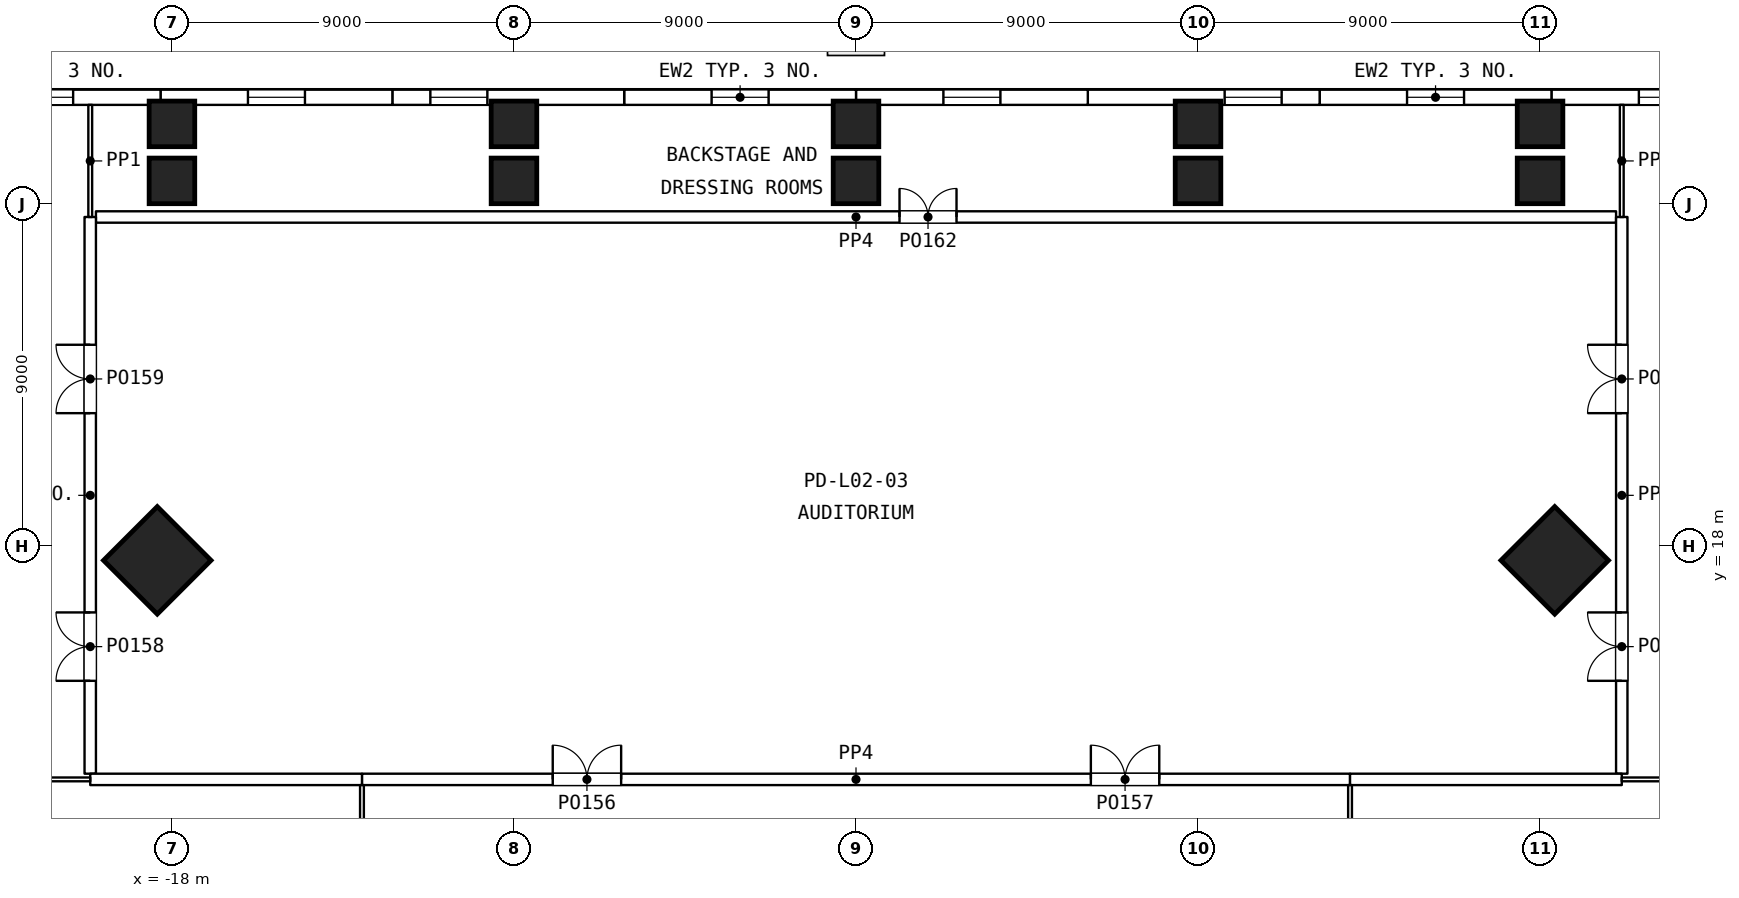
"""IFC4 building model, lengths in metres.
Left out: names, types, materials, properties, quantities, classifications, styles, units other than length and angle.
Written with IfcOpenShell. Run it as: python <this file> out.ifc"""

import sys

from ifc_helpers import new_model, si_unit, direction, frame, frame_2d, origin, origin_2d, place, context, subcontext, project, spatial, rectangle, extrude, element, fill, save


model = new_model("IFC4")
c1 = context("Model", 3, precision=1e-05, world=origin(), true_north=direction((0.0, 1.0)))
c2 = subcontext(c1, "Body", "Model", "MODEL_VIEW")
j1 = project(units=[si_unit("LENGTHUNIT", "METRE"), si_unit("PLANEANGLEUNIT", "RADIAN")], contexts=[c1])
p1 = place(None, origin())
s1 = spatial("IfcSite", under=j1, at=p1, CompositionType="ELEMENT")
p2 = place(p1, origin())
s2 = spatial("IfcBuilding", under=s1, at=p2, CompositionType="ELEMENT")
p3 = place(p2, frame((0.0, 0.0, 12.6)))
s3 = spatial("IfcBuildingStorey", under=s2, at=p3, CompositionType="ELEMENT", Elevation=12.6)
for number, where, z_axis, x_axis in (
    (1, (-18.0, 27.6, 0.0), (0.0, 0.0, 1.0), (1.0, 0.0, 0.0)),
    (2, (-18.0, 29.1, 0.0), (0.0, 0.0, 1.0), (1.0, 0.0, 0.0)),
    (3, (-9.0, 27.6, 0.0), (0.0, 0.0, 1.0), (1.0, 0.0, 0.0)),
    (4, (-9.0, 29.1, 0.0), (0.0, 0.0, 1.0), (1.0, 0.0, 0.0)),
    (5, (0.0, 27.6, 0.0), (0.0, 0.0, 1.0), (1.0, 0.0, 0.0)),
    (6, (0.0, 29.1, 0.0), (0.0, 0.0, 1.0), (1.0, 0.0, 0.0)),
    (7, (9.0, 27.6, 0.0), (0.0, 0.0, 1.0), (1.0, 0.0, 0.0)),
    (8, (9.0, 29.1, 0.0), (0.0, 0.0, 1.0), (1.0, 0.0, 0.0)),
    (9, (18.0, 27.6, 0.0), (0.0, 0.0, 1.0), (1.0, 0.0, 0.0)),
    (10, (18.0, 29.1, 0.0), (0.0, 0.0, 1.0), (1.0, 0.0, 0.0)),
):
    element("IfcColumn", number, at=place(p3, frame(where, z_axis=z_axis, x_axis=x_axis)), inside=s3, PredefinedType="COLUMN", context=c2, shape_type="SweptSolid", body=[
        extrude(rectangle(XDim=1.2, YDim=1.2, at=origin_2d()), origin(), (0.0, 0.0, 1.0), 5.4),
    ])
for number, where, z_axis, x_axis in (
    (11, (-18.386, 17.614, 0.0), (0.0, 0.0, 1.0), (0.707, 0.707, 0.0)),
    (12, (18.386, 17.614, 0.0), (0.0, 0.0, 1.0), (-0.707, 0.707, 0.0)),
):
    element("IfcColumn", number, at=place(p3, frame(where, z_axis=z_axis, x_axis=x_axis)), inside=s3, PredefinedType="COLUMN", context=c2, shape_type="SweptSolid", body=[
        extrude(rectangle(XDim=2.0, YDim=2.0, at=origin_2d()), origin(), (0.0, 0.0, 1.0), 5.4),
    ])
p4 = place(p3, frame((24.4, 29.8, 0.0), z_axis=(0.0, 0.0, 1.0), x_axis=(-1.0, 0.0, 0.0)))
e13 = element("IfcWall", 13, at=p4, inside=s3, PredefinedType="SOLIDWALL", context=c2, shape_type="SweptSolid", body=[
    extrude(rectangle(XDim=6.1, YDim=0.4, at=frame_2d((3.05, 0.0))), origin(), (0.0, 0.0, 1.0), 5.1),
])
p5 = place(p4, frame((2.3, 0.0, 1.0)))
e14 = element("IfcOpeningElement", 14, at=p5, cuts=e13, PredefinedType="OPENING", context=c2, shape_type="SweptSolid", body=[
    extrude(rectangle(XDim=1.5, YDim=2.4, at=frame_2d((0.75, 1.2))), frame((0.0, 0.21, 0.0), z_axis=(0.0, -1.0, 0.0), x_axis=(1.0, 0.0, 0.0)), (0.0, 0.0, 1.0), 0.42),
])
p6 = place(p3, frame((18.3, 29.8, 0.0), z_axis=(0.0, 0.0, 1.0), x_axis=(-1.0, 0.0, 0.0)))
e15 = element("IfcWall", 15, at=p6, inside=s3, PredefinedType="SOLIDWALL", context=c2, shape_type="SweptSolid", body=[
    extrude(rectangle(XDim=6.1, YDim=0.4, at=frame_2d((3.05, 0.0))), origin(), (0.0, 0.0, 1.0), 5.1),
])
p7 = place(p6, frame((2.3, 0.0, 1.0)))
e16 = element("IfcOpeningElement", 16, at=p7, cuts=e15, PredefinedType="OPENING", context=c2, shape_type="SweptSolid", body=[
    extrude(rectangle(XDim=1.5, YDim=2.4, at=frame_2d((0.75, 1.2))), frame((0.0, 0.21, 0.0), z_axis=(0.0, -1.0, 0.0), x_axis=(1.0, 0.0, 0.0)), (0.0, 0.0, 1.0), 0.42),
])
p8 = place(p3, frame((12.2, 29.8, 0.0), z_axis=(0.0, 0.0, 1.0), x_axis=(-1.0, 0.0, 0.0)))
e17 = element("IfcWall", 17, at=p8, inside=s3, PredefinedType="SOLIDWALL", context=c2, shape_type="SweptSolid", body=[
    extrude(rectangle(XDim=6.1, YDim=0.4, at=frame_2d((3.05, 0.0))), origin(), (0.0, 0.0, 1.0), 5.1),
])
p9 = place(p8, frame((1.0, 0.0, 1.0)))
e18 = element("IfcOpeningElement", 18, at=p9, cuts=e17, PredefinedType="OPENING", context=c2, shape_type="SweptSolid", body=[
    extrude(rectangle(XDim=1.5, YDim=2.4, at=frame_2d((0.75, 1.2))), frame((0.0, 0.21, 0.0), z_axis=(0.0, -1.0, 0.0), x_axis=(1.0, 0.0, 0.0)), (0.0, 0.0, 1.0), 0.42),
])
p10 = place(p3, frame((6.1, 29.8, 0.0), z_axis=(0.0, 0.0, 1.0), x_axis=(-1.0, 0.0, 0.0)))
e19 = element("IfcWall", 19, at=p10, inside=s3, PredefinedType="SOLIDWALL", context=c2, shape_type="SweptSolid", body=[
    extrude(rectangle(XDim=6.1, YDim=0.4, at=frame_2d((3.05, 0.0))), origin(), (0.0, 0.0, 1.0), 5.1),
])
p11 = place(p10, frame((2.3, 0.0, 1.0)))
e20 = element("IfcOpeningElement", 20, at=p11, cuts=e19, PredefinedType="OPENING", context=c2, shape_type="SweptSolid", body=[
    extrude(rectangle(XDim=1.5, YDim=2.4, at=frame_2d((0.75, 1.2))), frame((0.0, 0.21, 0.0), z_axis=(0.0, -1.0, 0.0), x_axis=(1.0, 0.0, 0.0)), (0.0, 0.0, 1.0), 0.42),
])
p12 = place(p3, frame((0.0, 29.8, 0.0), z_axis=(0.0, 0.0, 1.0), x_axis=(-1.0, 0.0, 0.0)))
e21 = element("IfcWall", 21, at=p12, inside=s3, PredefinedType="SOLIDWALL", context=c2, shape_type="SweptSolid", body=[
    extrude(rectangle(XDim=6.1, YDim=0.4, at=frame_2d((3.05, 0.0))), origin(), (0.0, 0.0, 1.0), 5.1),
])
p13 = place(p12, frame((2.3, 0.0, 1.0)))
e22 = element("IfcOpeningElement", 22, at=p13, cuts=e21, PredefinedType="OPENING", context=c2, shape_type="SweptSolid", body=[
    extrude(rectangle(XDim=1.5, YDim=2.4, at=frame_2d((0.75, 1.2))), frame((0.0, 0.21, 0.0), z_axis=(0.0, -1.0, 0.0), x_axis=(1.0, 0.0, 0.0)), (0.0, 0.0, 1.0), 0.42),
])
p14 = place(p3, frame((-6.1, 29.8, 0.0), z_axis=(0.0, 0.0, 1.0), x_axis=(-1.0, 0.0, 0.0)))
e23 = element("IfcWall", 23, at=p14, inside=s3, PredefinedType="SOLIDWALL", context=c2, shape_type="SweptSolid", body=[
    extrude(rectangle(XDim=6.1, YDim=0.4, at=frame_2d((3.05, 0.0))), origin(), (0.0, 0.0, 1.0), 5.1),
])
p15 = place(p14, frame((3.6, 0.0, 1.0)))
e24 = element("IfcOpeningElement", 24, at=p15, cuts=e23, PredefinedType="OPENING", context=c2, shape_type="SweptSolid", body=[
    extrude(rectangle(XDim=1.5, YDim=2.4, at=frame_2d((0.75, 1.2))), frame((0.0, 0.21, 0.0), z_axis=(0.0, -1.0, 0.0), x_axis=(1.0, 0.0, 0.0)), (0.0, 0.0, 1.0), 0.42),
])
p16 = place(p3, frame((-12.2, 29.8, 0.0), z_axis=(0.0, 0.0, 1.0), x_axis=(-1.0, 0.0, 0.0)))
e25 = element("IfcWall", 25, at=p16, inside=s3, PredefinedType="SOLIDWALL", context=c2, shape_type="SweptSolid", body=[
    extrude(rectangle(XDim=6.1, YDim=0.4, at=frame_2d((3.05, 0.0))), origin(), (0.0, 0.0, 1.0), 5.1),
])
p17 = place(p16, frame((2.3, 0.0, 1.0)))
e26 = element("IfcOpeningElement", 26, at=p17, cuts=e25, PredefinedType="OPENING", context=c2, shape_type="SweptSolid", body=[
    extrude(rectangle(XDim=1.5, YDim=2.4, at=frame_2d((0.75, 1.2))), frame((0.0, 0.21, 0.0), z_axis=(0.0, -1.0, 0.0), x_axis=(1.0, 0.0, 0.0)), (0.0, 0.0, 1.0), 0.42),
])
p18 = place(p3, frame((-18.3, 29.8, 0.0), z_axis=(0.0, 0.0, 1.0), x_axis=(-1.0, 0.0, 0.0)))
e27 = element("IfcWall", 27, at=p18, inside=s3, PredefinedType="SOLIDWALL", context=c2, shape_type="SweptSolid", body=[
    extrude(rectangle(XDim=6.1, YDim=0.4, at=frame_2d((3.05, 0.0))), origin(), (0.0, 0.0, 1.0), 5.1),
])
p19 = place(p18, frame((2.3, 0.0, 1.0)))
e28 = element("IfcOpeningElement", 28, at=p19, cuts=e27, PredefinedType="OPENING", context=c2, shape_type="SweptSolid", body=[
    extrude(rectangle(XDim=1.5, YDim=2.4, at=frame_2d((0.75, 1.2))), frame((0.0, 0.21, 0.0), z_axis=(0.0, -1.0, 0.0), x_axis=(1.0, 0.0, 0.0)), (0.0, 0.0, 1.0), 0.42),
])
p20 = place(p3, frame((-20.0, 26.65, 0.0), z_axis=(0.0, 0.0, 1.0), x_axis=(1.0, 0.0, 0.0)))
e29 = element("IfcWall", 29, at=p20, inside=s3, PredefinedType="PARTITIONING", context=c2, shape_type="SweptSolid", body=[
    extrude(rectangle(XDim=40.0, YDim=0.3, at=frame_2d((20.0, 0.0))), origin(), (0.0, 0.0, 1.0), 4.51),
])
p21 = place(p20, frame((21.145, 0.0, 0.0)))
e30 = element("IfcOpeningElement", 30, at=p21, cuts=e29, PredefinedType="OPENING", context=c2, shape_type="SweptSolid", body=[
    extrude(rectangle(XDim=1.5, YDim=2.1, at=frame_2d((0.75, 1.05))), frame((0.0, 0.16, 0.0), z_axis=(0.0, -1.0, 0.0), x_axis=(1.0, 0.0, 0.0)), (0.0, 0.0, 1.0), 0.32),
])
p22 = place(p3, frame((-20.15, 12.0, 0.0), z_axis=(0.0, 0.0, 1.0), x_axis=(0.0, 1.0, 0.0)))
e31 = element("IfcWall", 31, at=p22, inside=s3, PredefinedType="PARTITIONING", context=c2, shape_type="SweptSolid", body=[
    extrude(rectangle(XDim=14.65, YDim=0.3, at=frame_2d((7.325, 0.0))), origin(), (0.0, 0.0, 1.0), 5.1),
])
p23 = place(p22, frame((2.444, 0.0, 0.0)))
e32 = element("IfcOpeningElement", 32, at=p23, cuts=e31, PredefinedType="OPENING", context=c2, shape_type="SweptSolid", body=[
    extrude(rectangle(XDim=1.8, YDim=2.1, at=frame_2d((0.9, 1.05))), frame((0.0, 0.16, 0.0), z_axis=(0.0, -1.0, 0.0), x_axis=(1.0, 0.0, 0.0)), (0.0, 0.0, 1.0), 0.32),
])
p24 = place(p22, frame((9.488, 0.0, 0.0)))
e33 = element("IfcOpeningElement", 33, at=p24, cuts=e31, PredefinedType="OPENING", context=c2, shape_type="SweptSolid", body=[
    extrude(rectangle(XDim=1.8, YDim=2.1, at=frame_2d((0.9, 1.05))), frame((0.0, 0.16, 0.0), z_axis=(0.0, -1.0, 0.0), x_axis=(1.0, 0.0, 0.0)), (0.0, 0.0, 1.0), 0.32),
])
p25 = place(p3, frame((20.15, 12.0, 0.0), z_axis=(0.0, 0.0, 1.0), x_axis=(0.0, 1.0, 0.0)))
e34 = element("IfcWall", 34, at=p25, inside=s3, PredefinedType="PARTITIONING", context=c2, shape_type="SweptSolid", body=[
    extrude(rectangle(XDim=14.65, YDim=0.3, at=frame_2d((7.325, 0.0))), origin(), (0.0, 0.0, 1.0), 5.1),
])
p26 = place(p25, frame((2.444, 0.0, 0.0)))
e35 = element("IfcOpeningElement", 35, at=p26, cuts=e34, PredefinedType="OPENING", context=c2, shape_type="SweptSolid", body=[
    extrude(rectangle(XDim=1.8, YDim=2.1, at=frame_2d((0.9, 1.05))), frame((0.0, 0.16, 0.0), z_axis=(0.0, -1.0, 0.0), x_axis=(1.0, 0.0, 0.0)), (0.0, 0.0, 1.0), 0.32),
])
p27 = place(p25, frame((9.488, 0.0, 0.0)))
e36 = element("IfcOpeningElement", 36, at=p27, cuts=e34, PredefinedType="OPENING", context=c2, shape_type="SweptSolid", body=[
    extrude(rectangle(XDim=1.8, YDim=2.1, at=frame_2d((0.9, 1.05))), frame((0.0, 0.16, 0.0), z_axis=(0.0, -1.0, 0.0), x_axis=(1.0, 0.0, 0.0)), (0.0, 0.0, 1.0), 0.32),
])
p28 = place(p3, frame((-13.0, 11.85, 0.0), z_axis=(0.0, 0.0, 1.0), x_axis=(1.0, 0.0, 0.0)))
e37 = element("IfcWall", 37, at=p28, inside=s3, PredefinedType="PARTITIONING", context=c2, shape_type="SweptSolid", body=[
    extrude(rectangle(XDim=26.0, YDim=0.3, at=frame_2d((13.0, 0.0))), origin(), (0.0, 0.0, 1.0), 5.1),
])
p29 = place(p28, frame((5.02, 0.0, 0.0)))
e38 = element("IfcOpeningElement", 38, at=p29, cuts=e37, PredefinedType="OPENING", context=c2, shape_type="SweptSolid", body=[
    extrude(rectangle(XDim=1.8, YDim=2.1, at=frame_2d((0.9, 1.05))), frame((0.0, 0.16, 0.0), z_axis=(0.0, -1.0, 0.0), x_axis=(1.0, 0.0, 0.0)), (0.0, 0.0, 1.0), 0.32),
])
p30 = place(p28, frame((19.18, 0.0, 0.0)))
e39 = element("IfcOpeningElement", 39, at=p30, cuts=e37, PredefinedType="OPENING", context=c2, shape_type="SweptSolid", body=[
    extrude(rectangle(XDim=1.8, YDim=2.1, at=frame_2d((0.9, 1.05))), frame((0.0, 0.16, 0.0), z_axis=(0.0, -1.0, 0.0), x_axis=(1.0, 0.0, 0.0)), (0.0, 0.0, 1.0), 0.32),
])
for number, where, z_axis, x_axis in (
    (40, (-20.15, 11.85, 0.0), (0.0, 0.0, 1.0), (1.0, 0.0, 0.0)),
    (41, (13.0, 11.85, 0.0), (0.0, 0.0, 1.0), (1.0, 0.0, 0.0)),
):
    element("IfcWall", number, at=place(p3, frame(where, z_axis=z_axis, x_axis=x_axis)), inside=s3, PredefinedType="PARTITIONING", context=c2, shape_type="SweptSolid", body=[
        extrude(rectangle(XDim=7.15, YDim=0.3, at=frame_2d((3.575, 0.0))), origin(), (0.0, 0.0, 1.0), 5.1),
    ])
for number, where, z_axis, x_axis in (
    (42, (-20.15, 26.65, 0.0), (0.0, 0.0, 1.0), (0.0, 1.0, 0.0)),
    (43, (20.15, 26.65, 0.0), (0.0, 0.0, 1.0), (0.0, 1.0, 0.0)),
):
    element("IfcWall", number, at=place(p3, frame(where, z_axis=z_axis, x_axis=x_axis)), inside=s3, PredefinedType="PARTITIONING", context=c2, shape_type="SweptSolid", body=[
        extrude(rectangle(XDim=2.95, YDim=0.1, at=frame_2d((1.475, 0.0))), origin(), (0.0, 0.0, 1.0), 5.1),
    ])
p31 = place(p3, frame((-56.2, 11.85, 0.0), z_axis=(0.0, 0.0, 1.0), x_axis=(1.0, 0.0, 0.0)))
e44 = element("IfcWall", 44, at=p31, inside=s3, PredefinedType="PARTITIONING", context=c2, shape_type="SweptSolid", body=[
    extrude(rectangle(XDim=36.05, YDim=0.1, at=frame_2d((18.025, 0.0))), origin(), (0.0, 0.0, 1.0), 5.1),
])
p32 = place(p31, frame((17.125, 0.0, 0.0)))
e45 = element("IfcOpeningElement", 45, at=p32, cuts=e44, PredefinedType="OPENING", context=c2, shape_type="SweptSolid", body=[
    extrude(rectangle(XDim=1.8, YDim=2.1, at=frame_2d((0.9, 1.05))), frame((0.0, 0.06, 0.0), z_axis=(0.0, -1.0, 0.0), x_axis=(1.0, 0.0, 0.0)), (0.0, 0.0, 1.0), 0.12),
])
p33 = place(p3, frame((20.15, 11.85, 0.0), z_axis=(0.0, 0.0, 1.0), x_axis=(1.0, 0.0, 0.0)))
e46 = element("IfcWall", 46, at=p33, inside=s3, PredefinedType="PARTITIONING", context=c2, shape_type="SweptSolid", body=[
    extrude(rectangle(XDim=14.265, YDim=0.1, at=frame_2d((7.133, 0.0))), origin(), (0.0, 0.0, 1.0), 5.1),
])
p34 = place(p3, frame((-13.0, -11.8, 0.0), z_axis=(0.0, 0.0, 1.0), x_axis=(0.0, 1.0, 0.0)))
e47 = element("IfcWall", 47, at=p34, inside=s3, PredefinedType="PARTITIONING", context=c2, shape_type="SweptSolid", body=[
    extrude(rectangle(XDim=23.5, YDim=0.1, at=frame_2d((11.75, 0.0))), origin(), (0.0, 0.0, 1.0), 5.1),
])
p35 = place(p3, frame((13.0, -11.8, 0.0), z_axis=(0.0, 0.0, 1.0), x_axis=(0.0, 1.0, 0.0)))
e48 = element("IfcWall", 48, at=p35, inside=s3, PredefinedType="PARTITIONING", context=c2, shape_type="SweptSolid", body=[
    extrude(rectangle(XDim=23.5, YDim=0.1, at=frame_2d((11.75, 0.0))), origin(), (0.0, 0.0, 1.0), 5.1),
])
p36 = place(p35, frame((13.488, 0.0, 0.0)))
e49 = element("IfcOpeningElement", 49, at=p36, cuts=e48, PredefinedType="OPENING", context=c2, shape_type="SweptSolid", body=[
    extrude(rectangle(XDim=1.8, YDim=2.1, at=frame_2d((0.9, 1.05))), frame((0.0, 0.06, 0.0), z_axis=(0.0, -1.0, 0.0), x_axis=(1.0, 0.0, 0.0)), (0.0, 0.0, 1.0), 0.12),
])
p37 = place(p5, origin())
e50 = element("IfcWindow", 50, at=p37, inside=s3, PartitioningType="SINGLE_PANEL", PredefinedType="WINDOW", context=c2, shape_type="SweptSolid", body=[
    extrude(rectangle(XDim=1.5, YDim=2.4, at=frame_2d((0.75, 1.2))), frame((0.0, 0.03, 0.0), z_axis=(0.0, -1.0, 0.0), x_axis=(1.0, 0.0, 0.0)), (0.0, 0.0, 1.0), 0.06),
])
fill(e14, e50)
p38 = place(p7, origin())
e51 = element("IfcWindow", 51, at=p38, inside=s3, PartitioningType="SINGLE_PANEL", PredefinedType="WINDOW", context=c2, shape_type="SweptSolid", body=[
    extrude(rectangle(XDim=1.5, YDim=2.4, at=frame_2d((0.75, 1.2))), frame((0.0, 0.03, 0.0), z_axis=(0.0, -1.0, 0.0), x_axis=(1.0, 0.0, 0.0)), (0.0, 0.0, 1.0), 0.06),
])
fill(e16, e51)
p39 = place(p9, origin())
e52 = element("IfcWindow", 52, at=p39, inside=s3, PartitioningType="SINGLE_PANEL", PredefinedType="WINDOW", context=c2, shape_type="SweptSolid", body=[
    extrude(rectangle(XDim=1.5, YDim=2.4, at=frame_2d((0.75, 1.2))), frame((0.0, 0.03, 0.0), z_axis=(0.0, -1.0, 0.0), x_axis=(1.0, 0.0, 0.0)), (0.0, 0.0, 1.0), 0.06),
])
fill(e18, e52)
p40 = place(p11, origin())
e53 = element("IfcWindow", 53, at=p40, inside=s3, PartitioningType="SINGLE_PANEL", PredefinedType="WINDOW", context=c2, shape_type="SweptSolid", body=[
    extrude(rectangle(XDim=1.5, YDim=2.4, at=frame_2d((0.75, 1.2))), frame((0.0, 0.03, 0.0), z_axis=(0.0, -1.0, 0.0), x_axis=(1.0, 0.0, 0.0)), (0.0, 0.0, 1.0), 0.06),
])
fill(e20, e53)
p41 = place(p13, origin())
e54 = element("IfcWindow", 54, at=p41, inside=s3, PartitioningType="SINGLE_PANEL", PredefinedType="WINDOW", context=c2, shape_type="SweptSolid", body=[
    extrude(rectangle(XDim=1.5, YDim=2.4, at=frame_2d((0.75, 1.2))), frame((0.0, 0.03, 0.0), z_axis=(0.0, -1.0, 0.0), x_axis=(1.0, 0.0, 0.0)), (0.0, 0.0, 1.0), 0.06),
])
fill(e22, e54)
p42 = place(p15, origin())
e55 = element("IfcWindow", 55, at=p42, inside=s3, PartitioningType="SINGLE_PANEL", PredefinedType="WINDOW", context=c2, shape_type="SweptSolid", body=[
    extrude(rectangle(XDim=1.5, YDim=2.4, at=frame_2d((0.75, 1.2))), frame((0.0, 0.03, 0.0), z_axis=(0.0, -1.0, 0.0), x_axis=(1.0, 0.0, 0.0)), (0.0, 0.0, 1.0), 0.06),
])
fill(e24, e55)
p43 = place(p17, origin())
e56 = element("IfcWindow", 56, at=p43, inside=s3, PartitioningType="SINGLE_PANEL", PredefinedType="WINDOW", context=c2, shape_type="SweptSolid", body=[
    extrude(rectangle(XDim=1.5, YDim=2.4, at=frame_2d((0.75, 1.2))), frame((0.0, 0.03, 0.0), z_axis=(0.0, -1.0, 0.0), x_axis=(1.0, 0.0, 0.0)), (0.0, 0.0, 1.0), 0.06),
])
fill(e26, e56)
p44 = place(p19, origin())
e57 = element("IfcWindow", 57, at=p44, inside=s3, PartitioningType="SINGLE_PANEL", PredefinedType="WINDOW", context=c2, shape_type="SweptSolid", body=[
    extrude(rectangle(XDim=1.5, YDim=2.4, at=frame_2d((0.75, 1.2))), frame((0.0, 0.03, 0.0), z_axis=(0.0, -1.0, 0.0), x_axis=(1.0, 0.0, 0.0)), (0.0, 0.0, 1.0), 0.06),
])
fill(e28, e57)
p45 = place(p29, origin())
e58 = element("IfcDoor", 58, at=p45, inside=s3, OperationType="DOUBLE_DOOR_DOUBLE_SWING", PredefinedType="DOOR", context=c2, shape_type="SweptSolid", body=[
    extrude(rectangle(XDim=1.8, YDim=2.1, at=frame_2d((0.9, 1.05))), frame((0.0, 0.025, 0.0), z_axis=(0.0, -1.0, 0.0), x_axis=(1.0, 0.0, 0.0)), (0.0, 0.0, 1.0), 0.05),
])
fill(e38, e58)
p46 = place(p30, origin())
e59 = element("IfcDoor", 59, at=p46, inside=s3, OperationType="DOUBLE_DOOR_DOUBLE_SWING", PredefinedType="DOOR", context=c2, shape_type="SweptSolid", body=[
    extrude(rectangle(XDim=1.8, YDim=2.1, at=frame_2d((0.9, 1.05))), frame((0.0, 0.025, 0.0), z_axis=(0.0, -1.0, 0.0), x_axis=(1.0, 0.0, 0.0)), (0.0, 0.0, 1.0), 0.05),
])
fill(e39, e59)
p47 = place(p23, origin())
e60 = element("IfcDoor", 60, at=p47, inside=s3, OperationType="DOUBLE_DOOR_DOUBLE_SWING", PredefinedType="DOOR", context=c2, shape_type="SweptSolid", body=[
    extrude(rectangle(XDim=1.8, YDim=2.1, at=frame_2d((0.9, 1.05))), frame((0.0, 0.025, 0.0), z_axis=(0.0, -1.0, 0.0), x_axis=(1.0, 0.0, 0.0)), (0.0, 0.0, 1.0), 0.05),
])
fill(e32, e60)
p48 = place(p24, origin())
e61 = element("IfcDoor", 61, at=p48, inside=s3, OperationType="DOUBLE_DOOR_DOUBLE_SWING", PredefinedType="DOOR", context=c2, shape_type="SweptSolid", body=[
    extrude(rectangle(XDim=1.8, YDim=2.1, at=frame_2d((0.9, 1.05))), frame((0.0, 0.025, 0.0), z_axis=(0.0, -1.0, 0.0), x_axis=(1.0, 0.0, 0.0)), (0.0, 0.0, 1.0), 0.05),
])
fill(e33, e61)
p49 = place(p26, origin())
e62 = element("IfcDoor", 62, at=p49, inside=s3, OperationType="DOUBLE_DOOR_DOUBLE_SWING", PredefinedType="DOOR", context=c2, shape_type="SweptSolid", body=[
    extrude(rectangle(XDim=1.8, YDim=2.1, at=frame_2d((0.9, 1.05))), frame((0.0, 0.025, 0.0), z_axis=(0.0, -1.0, 0.0), x_axis=(1.0, 0.0, 0.0)), (0.0, 0.0, 1.0), 0.05),
])
fill(e35, e62)
p50 = place(p27, origin())
e63 = element("IfcDoor", 63, at=p50, inside=s3, OperationType="DOUBLE_DOOR_DOUBLE_SWING", PredefinedType="DOOR", context=c2, shape_type="SweptSolid", body=[
    extrude(rectangle(XDim=1.8, YDim=2.1, at=frame_2d((0.9, 1.05))), frame((0.0, 0.025, 0.0), z_axis=(0.0, -1.0, 0.0), x_axis=(1.0, 0.0, 0.0)), (0.0, 0.0, 1.0), 0.05),
])
fill(e36, e63)
p51 = place(p21, origin())
e64 = element("IfcDoor", 64, at=p51, inside=s3, OperationType="DOUBLE_DOOR_DOUBLE_SWING", PredefinedType="DOOR", context=c2, shape_type="SweptSolid", body=[
    extrude(rectangle(XDim=1.5, YDim=2.1, at=frame_2d((0.75, 1.05))), frame((0.0, 0.025, 0.0), z_axis=(0.0, -1.0, 0.0), x_axis=(1.0, 0.0, 0.0)), (0.0, 0.0, 1.0), 0.05),
])
fill(e30, e64)
save(model, sys.argv[1])
